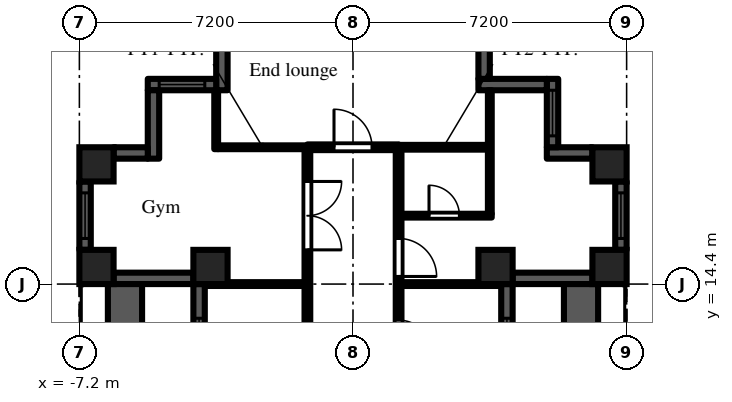
"""IFC4 building model, lengths in metres.
Left out: names, types, materials, properties, quantities, classifications, styles, units other than length and angle.
Written with IfcOpenShell. Run it as: python <this file> out.ifc"""

import sys

from ifc_helpers import new_model, si_unit, direction, frame, frame_2d, origin, origin_2d, place, context, subcontext, project, spatial, rectangle, extrude, element, fill, save


model = new_model("IFC4")
c1 = context("Model", 3, precision=1e-05, world=origin(), true_north=direction((0.0, 1.0)))
c2 = subcontext(c1, "Body", "Model", "MODEL_VIEW")
j1 = project(units=[si_unit("LENGTHUNIT", "METRE"), si_unit("PLANEANGLEUNIT", "RADIAN")], contexts=[c1])
p1 = place(None, origin())
s1 = spatial("IfcSite", under=j1, at=p1, CompositionType="ELEMENT")
p2 = place(p1, origin())
s2 = spatial("IfcBuilding", under=s1, at=p2, CompositionType="ELEMENT")
p3 = place(p2, frame((0.0, 0.0, 108.9)))
s3 = spatial("IfcBuildingStorey", under=s2, at=p3, CompositionType="ELEMENT", Elevation=108.9)
for number, where, z_axis, x_axis in (
    (1, (-6.75, 14.85, 0.0), (0.0, 0.0, 1.0), (1.0, 0.0, 0.0)),
    (2, (-6.75, 17.55, 0.0), (0.0, 0.0, 1.0), (1.0, 0.0, 0.0)),
    (3, (-3.75, 14.85, 0.0), (0.0, 0.0, 1.0), (1.0, 0.0, 0.0)),
    (4, (3.75, 14.85, 0.0), (0.0, 0.0, 1.0), (1.0, 0.0, 0.0)),
    (5, (6.75, 14.85, 0.0), (0.0, 0.0, 1.0), (1.0, 0.0, 0.0)),
    (6, (6.75, 17.55, 0.0), (0.0, 0.0, 1.0), (1.0, 0.0, 0.0)),
):
    element("IfcColumn", number, at=place(p3, frame(where, z_axis=z_axis, x_axis=x_axis)), inside=s3, PredefinedType="COLUMN", context=c2, shape_type="SweptSolid", body=[
        extrude(rectangle(XDim=0.9, YDim=0.9, at=origin_2d()), origin(), (0.0, 0.0, 1.0), 3.0),
    ])
p4 = place(p3, frame((4.05, 7.2, 0.0), z_axis=(0.0, 0.0, 1.0), x_axis=(0.0, 1.0, 0.0)))
e7 = element("IfcWall", 7, at=p4, inside=s3, PredefinedType="SOLIDWALL", context=c2, shape_type="SweptSolid", body=[
    extrude(rectangle(XDim=7.2, YDim=0.3, at=frame_2d((3.6, 0.0))), origin(), (0.0, 0.0, 1.0), 2.55),
])
p5 = place(p4, frame((3.0, 0.0, 0.0)))
e8 = element("IfcOpeningElement", 8, at=p5, cuts=e7, PredefinedType="OPENING", context=c2, shape_type="SweptSolid", body=[
    extrude(rectangle(XDim=1.2, YDim=2.05, at=frame_2d((0.6, 1.025))), frame((0.0, 0.16, 0.0), z_axis=(0.0, -1.0, 0.0), x_axis=(1.0, 0.0, 0.0)), (0.0, 0.0, 1.0), 0.32),
])
p6 = place(p4, frame((0.9, 0.0, 0.2)))
e9 = element("IfcOpeningElement", 9, at=p6, cuts=e7, PredefinedType="OPENING", context=c2, shape_type="SweptSolid", body=[
    extrude(rectangle(XDim=1.8, YDim=1.85, at=frame_2d((0.9, 0.925))), frame((0.0, 0.16, 0.0), z_axis=(0.0, -1.0, 0.0), x_axis=(1.0, 0.0, 0.0)), (0.0, 0.0, 1.0), 0.32),
])
p7 = place(p4, frame((4.5, 0.0, 0.2)))
e10 = element("IfcOpeningElement", 10, at=p7, cuts=e7, PredefinedType="OPENING", context=c2, shape_type="SweptSolid", body=[
    extrude(rectangle(XDim=1.8, YDim=1.85, at=frame_2d((0.9, 0.925))), frame((0.0, 0.16, 0.0), z_axis=(0.0, -1.0, 0.0), x_axis=(1.0, 0.0, 0.0)), (0.0, 0.0, 1.0), 0.32),
])
p8 = place(p3, frame((4.2, 14.55, 0.0), z_axis=(0.0, 0.0, 1.0), x_axis=(1.0, 0.0, 0.0)))
e11 = element("IfcWall", 11, at=p8, inside=s3, PredefinedType="SOLIDWALL", context=c2, shape_type="SweptSolid", body=[
    extrude(rectangle(XDim=2.1, YDim=0.3, at=frame_2d((1.05, 0.0))), origin(), (0.0, 0.0, 1.0), 2.55),
])
p9 = place(p3, frame((7.05, 15.3, 0.0), z_axis=(0.0, 0.0, 1.0), x_axis=(0.0, 1.0, 0.0)))
e12 = element("IfcWall", 12, at=p9, inside=s3, PredefinedType="SOLIDWALL", context=c2, shape_type="SweptSolid", body=[
    extrude(rectangle(XDim=1.8, YDim=0.3, at=frame_2d((0.9, 0.0))), origin(), (0.0, 0.0, 1.0), 2.2),
])
p10 = place(p9, frame((0.3, 0.0, 0.2)))
e13 = element("IfcOpeningElement", 13, at=p10, cuts=e12, PredefinedType="OPENING", context=c2, shape_type="SweptSolid", body=[
    extrude(rectangle(XDim=1.2, YDim=1.85, at=frame_2d((0.6, 0.925))), frame((0.0, 0.16, 0.0), z_axis=(0.0, -1.0, 0.0), x_axis=(1.0, 0.0, 0.0)), (0.0, 0.0, 1.0), 0.32),
])
p11 = place(p3, frame((6.3, 17.85, 0.0), z_axis=(0.0, 0.0, 1.0), x_axis=(-1.0, 0.0, 0.0)))
e14 = element("IfcWall", 14, at=p11, inside=s3, PredefinedType="SOLIDWALL", context=c2, shape_type="SweptSolid", body=[
    extrude(rectangle(XDim=1.2, YDim=0.3, at=frame_2d((0.6, 0.0))), origin(), (0.0, 0.0, 1.0), 2.55),
])
p12 = place(p3, frame((5.25, 18.0, 0.0), z_axis=(0.0, 0.0, 1.0), x_axis=(0.0, 1.0, 0.0)))
e15 = element("IfcWall", 15, at=p12, inside=s3, PredefinedType="SOLIDWALL", context=c2, shape_type="SweptSolid", body=[
    extrude(rectangle(XDim=1.8, YDim=0.3, at=frame_2d((0.9, 0.0))), origin(), (0.0, 0.0, 1.0), 2.55),
])
p13 = place(p12, frame((0.3, 0.0, 0.2)))
e16 = element("IfcOpeningElement", 16, at=p13, cuts=e15, PredefinedType="OPENING", context=c2, shape_type="SweptSolid", body=[
    extrude(rectangle(XDim=1.2, YDim=1.85, at=frame_2d((0.6, 0.925))), frame((0.0, 0.16, 0.0), z_axis=(0.0, -1.0, 0.0), x_axis=(1.0, 0.0, 0.0)), (0.0, 0.0, 1.0), 0.32),
])
p14 = place(p3, frame((5.1, 19.65, 0.0), z_axis=(0.0, 0.0, 1.0), x_axis=(-1.0, 0.0, 0.0)))
e17 = element("IfcWall", 17, at=p14, inside=s3, PredefinedType="SOLIDWALL", context=c2, shape_type="SweptSolid", body=[
    extrude(rectangle(XDim=1.8, YDim=0.3, at=frame_2d((0.9, 0.0))), origin(), (0.0, 0.0, 1.0), 2.55),
])
p15 = place(p3, frame((3.45, 19.8, 0.0), z_axis=(0.0, 0.0, 1.0), x_axis=(0.0, 1.0, 0.0)))
e18 = element("IfcWall", 18, at=p15, inside=s3, PredefinedType="SOLIDWALL", context=c2, shape_type="SweptSolid", body=[
    extrude(rectangle(XDim=0.9, YDim=0.3, at=frame_2d((0.45, 0.0))), origin(), (0.0, 0.0, 1.0), 2.55),
])
p16 = place(p3, frame((-3.45, 20.7, 0.0), z_axis=(0.0, 0.0, 1.0), x_axis=(0.0, -1.0, 0.0)))
e19 = element("IfcWall", 19, at=p16, inside=s3, PredefinedType="SOLIDWALL", context=c2, shape_type="SweptSolid", body=[
    extrude(rectangle(XDim=1.2, YDim=0.3, at=frame_2d((0.6, 0.0))), origin(), (0.0, 0.0, 1.0), 2.55),
])
p17 = place(p3, frame((-3.6, 19.65, 0.0), z_axis=(0.0, 0.0, 1.0), x_axis=(-1.0, 0.0, 0.0)))
e20 = element("IfcWall", 20, at=p17, inside=s3, PredefinedType="SOLIDWALL", context=c2, shape_type="SweptSolid", body=[
    extrude(rectangle(XDim=1.8, YDim=0.3, at=frame_2d((0.9, 0.0))), origin(), (0.0, 0.0, 1.0), 2.55),
])
p18 = place(p17, frame((0.3, 0.0, 0.2)))
e21 = element("IfcOpeningElement", 21, at=p18, cuts=e20, PredefinedType="OPENING", context=c2, shape_type="SweptSolid", body=[
    extrude(rectangle(XDim=1.2, YDim=1.85, at=frame_2d((0.6, 0.925))), frame((0.0, 0.16, 0.0), z_axis=(0.0, -1.0, 0.0), x_axis=(1.0, 0.0, 0.0)), (0.0, 0.0, 1.0), 0.32),
])
p19 = place(p3, frame((-5.25, 19.5, 0.0), z_axis=(0.0, 0.0, 1.0), x_axis=(0.0, -1.0, 0.0)))
e22 = element("IfcWall", 22, at=p19, inside=s3, PredefinedType="SOLIDWALL", context=c2, shape_type="SweptSolid", body=[
    extrude(rectangle(XDim=1.8, YDim=0.3, at=frame_2d((0.9, 0.0))), origin(), (0.0, 0.0, 1.0), 2.55),
])
p20 = place(p3, frame((-5.4, 17.85, 0.0), z_axis=(0.0, 0.0, 1.0), x_axis=(-1.0, 0.0, 0.0)))
e23 = element("IfcWall", 23, at=p20, inside=s3, PredefinedType="SOLIDWALL", context=c2, shape_type="SweptSolid", body=[
    extrude(rectangle(XDim=0.9, YDim=0.3, at=frame_2d((0.45, 0.0))), origin(), (0.0, 0.0, 1.0), 2.55),
])
p21 = place(p3, frame((-7.05, 17.1, 0.0), z_axis=(0.0, 0.0, 1.0), x_axis=(0.0, -1.0, 0.0)))
e24 = element("IfcWall", 24, at=p21, inside=s3, PredefinedType="SOLIDWALL", context=c2, shape_type="SweptSolid", body=[
    extrude(rectangle(XDim=1.8, YDim=0.3, at=frame_2d((0.9, 0.0))), origin(), (0.0, 0.0, 1.0), 2.2),
])
p22 = place(p21, frame((0.3, 0.0, 0.2)))
e25 = element("IfcOpeningElement", 25, at=p22, cuts=e24, PredefinedType="OPENING", context=c2, shape_type="SweptSolid", body=[
    extrude(rectangle(XDim=1.2, YDim=1.85, at=frame_2d((0.6, 0.925))), frame((0.0, 0.16, 0.0), z_axis=(0.0, -1.0, 0.0), x_axis=(1.0, 0.0, 0.0)), (0.0, 0.0, 1.0), 0.32),
])
p23 = place(p3, frame((-6.3, 14.55, 0.0), z_axis=(0.0, 0.0, 1.0), x_axis=(1.0, 0.0, 0.0)))
e26 = element("IfcWall", 26, at=p23, inside=s3, PredefinedType="SOLIDWALL", context=c2, shape_type="SweptSolid", body=[
    extrude(rectangle(XDim=2.1, YDim=0.3, at=frame_2d((1.05, 0.0))), origin(), (0.0, 0.0, 1.0), 2.55),
])
p24 = place(p3, frame((-4.05, 14.4, 0.0), z_axis=(0.0, 0.0, 1.0), x_axis=(0.0, -1.0, 0.0)))
e27 = element("IfcWall", 27, at=p24, inside=s3, PredefinedType="SOLIDWALL", context=c2, shape_type="SweptSolid", body=[
    extrude(rectangle(XDim=7.2, YDim=0.3, at=frame_2d((3.6, 0.0))), origin(), (0.0, 0.0, 1.0), 2.55),
])
p25 = place(p24, frame((3.0, 0.0, 0.0)))
e28 = element("IfcOpeningElement", 28, at=p25, cuts=e27, PredefinedType="OPENING", context=c2, shape_type="SweptSolid", body=[
    extrude(rectangle(XDim=1.2, YDim=2.05, at=frame_2d((0.6, 1.025))), frame((0.0, 0.16, 0.0), z_axis=(0.0, -1.0, 0.0), x_axis=(1.0, 0.0, 0.0)), (0.0, 0.0, 1.0), 0.32),
])
p26 = place(p24, frame((0.9, 0.0, 0.2)))
e29 = element("IfcOpeningElement", 29, at=p26, cuts=e27, PredefinedType="OPENING", context=c2, shape_type="SweptSolid", body=[
    extrude(rectangle(XDim=1.8, YDim=1.85, at=frame_2d((0.9, 0.925))), frame((0.0, 0.16, 0.0), z_axis=(0.0, -1.0, 0.0), x_axis=(1.0, 0.0, 0.0)), (0.0, 0.0, 1.0), 0.32),
])
p27 = place(p24, frame((4.5, 0.0, 0.2)))
e30 = element("IfcOpeningElement", 30, at=p27, cuts=e27, PredefinedType="OPENING", context=c2, shape_type="SweptSolid", body=[
    extrude(rectangle(XDim=1.8, YDim=1.85, at=frame_2d((0.9, 0.925))), frame((0.0, 0.16, 0.0), z_axis=(0.0, -1.0, 0.0), x_axis=(1.0, 0.0, 0.0)), (0.0, 0.0, 1.0), 0.32),
])
for number, where, z_axis, x_axis in (
    (31, (6.0, 7.2, 0.0), (0.0, 0.0, 1.0), (0.0, 1.0, 0.0)),
    (32, (-6.0, 7.2, 0.0), (0.0, 0.0, 1.0), (0.0, 1.0, 0.0)),
):
    element("IfcWall", number, at=place(p3, frame(where, z_axis=z_axis, x_axis=x_axis)), inside=s3, PredefinedType="PARAPET", context=c2, shape_type="SweptSolid", body=[
        extrude(rectangle(XDim=7.2, YDim=0.9, at=frame_2d((3.6, 0.0))), origin(), (0.0, 0.0, 1.0), 0.8),
    ])
p28 = place(p3, frame((-3.9, 14.4, 0.0), z_axis=(0.0, 0.0, 1.0), x_axis=(1.0, 0.0, 0.0)))
e33 = element("IfcWall", 33, at=p28, inside=s3, PredefinedType="PARTITIONING", context=c2, shape_type="SweptSolid", body=[
    extrude(rectangle(XDim=2.625, YDim=0.1, at=frame_2d((1.312, 0.0))), origin(), (0.0, 0.0, 1.0), 2.55),
])
p29 = place(p3, frame((-3.6, 17.95, 0.0), z_axis=(0.0, 0.0, 1.0), x_axis=(0.0, 1.0, 0.0)))
e34 = element("IfcWall", 34, at=p29, inside=s3, PredefinedType="PARTITIONING", context=c2, shape_type="SweptSolid", body=[
    extrude(rectangle(XDim=1.55, YDim=0.1, at=frame_2d((0.775, 0.0))), origin(), (0.0, 0.0, 1.0), 2.55),
])
p30 = place(p3, frame((-3.55, 18.0, 0.0), z_axis=(0.0, 0.0, 1.0), x_axis=(1.0, 0.0, 0.0)))
e35 = element("IfcWall", 35, at=p30, inside=s3, PredefinedType="PARTITIONING", context=c2, shape_type="SweptSolid", body=[
    extrude(rectangle(XDim=2.35, YDim=0.1, at=frame_2d((1.175, 0.0))), origin(), (0.0, 0.0, 1.0), 2.55),
])
p31 = place(p3, frame((-1.2, 1.275, 0.0), z_axis=(0.0, 0.0, 1.0), x_axis=(0.0, 1.0, 0.0)))
e36 = element("IfcWall", 36, at=p31, inside=s3, PredefinedType="PARTITIONING", context=c2, shape_type="SweptSolid", body=[
    extrude(rectangle(XDim=16.65, YDim=0.15, at=frame_2d((8.325, 0.0))), origin(), (0.0, 0.0, 1.0), 2.55),
])
p32 = place(p31, frame((3.575, 0.0, 0.0)))
e37 = element("IfcOpeningElement", 37, at=p32, cuts=e36, PredefinedType="OPENING", context=c2, shape_type="SweptSolid", body=[
    extrude(rectangle(XDim=0.9, YDim=2.1, at=frame_2d((0.45, 1.05))), frame((0.0, 0.085, 0.0), z_axis=(0.0, -1.0, 0.0), x_axis=(1.0, 0.0, 0.0)), (0.0, 0.0, 1.0), 0.17),
])
p33 = place(p31, frame((6.875, 0.0, 0.0)))
e38 = element("IfcOpeningElement", 38, at=p33, cuts=e36, PredefinedType="OPENING", context=c2, shape_type="SweptSolid", body=[
    extrude(rectangle(XDim=0.9, YDim=2.1, at=frame_2d((0.45, 1.05))), frame((0.0, 0.085, 0.0), z_axis=(0.0, -1.0, 0.0), x_axis=(1.0, 0.0, 0.0)), (0.0, 0.0, 1.0), 0.17),
])
p34 = place(p31, frame((10.475, 0.0, 0.0)))
e39 = element("IfcOpeningElement", 39, at=p34, cuts=e36, PredefinedType="OPENING", context=c2, shape_type="SweptSolid", body=[
    extrude(rectangle(XDim=0.9, YDim=2.1, at=frame_2d((0.45, 1.05))), frame((0.0, 0.085, 0.0), z_axis=(0.0, -1.0, 0.0), x_axis=(1.0, 0.0, 0.0)), (0.0, 0.0, 1.0), 0.17),
])
p35 = place(p31, frame((14.025, 0.0, 0.0)))
e40 = element("IfcOpeningElement", 40, at=p35, cuts=e36, PredefinedType="OPENING", context=c2, shape_type="SweptSolid", body=[
    extrude(rectangle(XDim=1.8, YDim=2.1, at=frame_2d((0.9, 1.05))), frame((0.0, 0.085, 0.0), z_axis=(0.0, -1.0, 0.0), x_axis=(1.0, 0.0, 0.0)), (0.0, 0.0, 1.0), 0.17),
])
p36 = place(p3, frame((-1.2, 18.0, 0.0), z_axis=(0.0, 0.0, 1.0), x_axis=(1.0, 0.0, 0.0)))
e41 = element("IfcWall", 41, at=p36, inside=s3, PredefinedType="PARTITIONING", context=c2, shape_type="SweptSolid", body=[
    extrude(rectangle(XDim=2.4, YDim=0.15, at=frame_2d((1.2, 0.0))), origin(), (0.0, 0.0, 1.0), 2.55),
])
p37 = place(p36, frame((0.7, 0.0, 0.0)))
e42 = element("IfcOpeningElement", 42, at=p37, cuts=e41, PredefinedType="OPENING", context=c2, shape_type="SweptSolid", body=[
    extrude(rectangle(XDim=1.0, YDim=2.1, at=frame_2d((0.5, 1.05))), frame((0.0, 0.085, 0.0), z_axis=(0.0, -1.0, 0.0), x_axis=(1.0, 0.0, 0.0)), (0.0, 0.0, 1.0), 0.17),
])
p38 = place(p3, frame((1.2, 1.125, 0.0), z_axis=(0.0, 0.0, 1.0), x_axis=(0.0, 1.0, 0.0)))
e43 = element("IfcWall", 43, at=p38, inside=s3, PredefinedType="PARTITIONING", context=c2, shape_type="SweptSolid", body=[
    extrude(rectangle(XDim=16.8, YDim=0.15, at=frame_2d((8.4, 0.0))), origin(), (0.0, 0.0, 1.0), 2.55),
])
p39 = place(p38, frame((3.725, 0.0, 0.0)))
e44 = element("IfcOpeningElement", 44, at=p39, cuts=e43, PredefinedType="OPENING", context=c2, shape_type="SweptSolid", body=[
    extrude(rectangle(XDim=0.9, YDim=2.1, at=frame_2d((0.45, 1.05))), frame((0.0, 0.085, 0.0), z_axis=(0.0, -1.0, 0.0), x_axis=(1.0, 0.0, 0.0)), (0.0, 0.0, 1.0), 0.17),
])
p40 = place(p38, frame((11.425, 0.0, 0.0)))
e45 = element("IfcOpeningElement", 45, at=p40, cuts=e43, PredefinedType="OPENING", context=c2, shape_type="SweptSolid", body=[
    extrude(rectangle(XDim=0.9, YDim=2.1, at=frame_2d((0.45, 1.05))), frame((0.0, 0.085, 0.0), z_axis=(0.0, -1.0, 0.0), x_axis=(1.0, 0.0, 0.0)), (0.0, 0.0, 1.0), 0.17),
])
p41 = place(p38, frame((7.825, 0.0, 0.0)))
e46 = element("IfcOpeningElement", 46, at=p41, cuts=e43, PredefinedType="OPENING", context=c2, shape_type="SweptSolid", body=[
    extrude(rectangle(XDim=0.9, YDim=2.1, at=frame_2d((0.45, 1.05))), frame((0.0, 0.085, 0.0), z_axis=(0.0, -1.0, 0.0), x_axis=(1.0, 0.0, 0.0)), (0.0, 0.0, 1.0), 0.17),
])
p42 = place(p38, frame((13.475, 0.0, 0.0)))
e47 = element("IfcOpeningElement", 47, at=p42, cuts=e43, PredefinedType="OPENING", context=c2, shape_type="SweptSolid", body=[
    extrude(rectangle(XDim=1.0, YDim=2.1, at=frame_2d((0.5, 1.05))), frame((0.0, 0.085, 0.0), z_axis=(0.0, -1.0, 0.0), x_axis=(1.0, 0.0, 0.0)), (0.0, 0.0, 1.0), 0.17),
])
p43 = place(p3, frame((1.275, 14.4, 0.0), z_axis=(0.0, 0.0, 1.0), x_axis=(1.0, 0.0, 0.0)))
e48 = element("IfcWall", 48, at=p43, inside=s3, PredefinedType="PARTITIONING", context=c2, shape_type="SweptSolid", body=[
    extrude(rectangle(XDim=2.625, YDim=0.1, at=frame_2d((1.312, 0.0))), origin(), (0.0, 0.0, 1.0), 2.55),
])
p44 = place(p3, frame((1.275, 16.2, 0.0), z_axis=(0.0, 0.0, 1.0), x_axis=(1.0, 0.0, 0.0)))
e49 = element("IfcWall", 49, at=p44, inside=s3, PredefinedType="PARTITIONING", context=c2, shape_type="SweptSolid", body=[
    extrude(rectangle(XDim=2.375, YDim=0.1, at=frame_2d((1.188, 0.0))), origin(), (0.0, 0.0, 1.0), 2.55),
])
p45 = place(p44, frame((0.725, 0.0, 0.0)))
e50 = element("IfcOpeningElement", 50, at=p45, cuts=e49, PredefinedType="OPENING", context=c2, shape_type="SweptSolid", body=[
    extrude(rectangle(XDim=0.8, YDim=2.1, at=frame_2d((0.4, 1.05))), frame((0.0, 0.06, 0.0), z_axis=(0.0, -1.0, 0.0), x_axis=(1.0, 0.0, 0.0)), (0.0, 0.0, 1.0), 0.12),
])
p46 = place(p3, frame((1.2, 18.0, 0.0), z_axis=(0.0, 0.0, 1.0), x_axis=(1.0, 0.0, 0.0)))
e51 = element("IfcWall", 51, at=p46, inside=s3, PredefinedType="PARTITIONING", context=c2, shape_type="SweptSolid", body=[
    extrude(rectangle(XDim=2.35, YDim=0.125, at=frame_2d((1.175, 0.0))), origin(), (0.0, 0.0, 1.0), 2.55),
])
p47 = place(p3, frame((3.6, 16.25, 0.0), z_axis=(0.0, 0.0, 1.0), x_axis=(0.0, 1.0, 0.0)))
e52 = element("IfcWall", 52, at=p47, inside=s3, PredefinedType="PARTITIONING", context=c2, shape_type="SweptSolid", body=[
    extrude(rectangle(XDim=3.25, YDim=0.1, at=frame_2d((1.625, 0.0))), origin(), (0.0, 0.0, 1.0), 2.55),
])
p48 = place(p7, origin())
e53 = element("IfcWindow", 53, at=p48, inside=s3, PartitioningType="SINGLE_PANEL", PredefinedType="WINDOW", context=c2, shape_type="SweptSolid", body=[
    extrude(rectangle(XDim=1.8, YDim=1.85, at=frame_2d((0.9, 0.925))), frame((0.0, 0.03, 0.0), z_axis=(0.0, -1.0, 0.0), x_axis=(1.0, 0.0, 0.0)), (0.0, 0.0, 1.0), 0.06),
])
fill(e10, e53)
p49 = place(p10, origin())
e54 = element("IfcWindow", 54, at=p49, inside=s3, PartitioningType="SINGLE_PANEL", PredefinedType="WINDOW", context=c2, shape_type="SweptSolid", body=[
    extrude(rectangle(XDim=1.2, YDim=1.85, at=frame_2d((0.6, 0.925))), frame((0.0, 0.03, 0.0), z_axis=(0.0, -1.0, 0.0), x_axis=(1.0, 0.0, 0.0)), (0.0, 0.0, 1.0), 0.06),
])
fill(e13, e54)
p50 = place(p13, origin())
e55 = element("IfcWindow", 55, at=p50, inside=s3, PartitioningType="SINGLE_PANEL", PredefinedType="WINDOW", context=c2, shape_type="SweptSolid", body=[
    extrude(rectangle(XDim=1.2, YDim=1.85, at=frame_2d((0.6, 0.925))), frame((0.0, 0.03, 0.0), z_axis=(0.0, -1.0, 0.0), x_axis=(1.0, 0.0, 0.0)), (0.0, 0.0, 1.0), 0.06),
])
fill(e16, e55)
p51 = place(p18, origin())
e56 = element("IfcWindow", 56, at=p51, inside=s3, PartitioningType="SINGLE_PANEL", PredefinedType="WINDOW", context=c2, shape_type="SweptSolid", body=[
    extrude(rectangle(XDim=1.2, YDim=1.85, at=frame_2d((0.6, 0.925))), frame((0.0, 0.03, 0.0), z_axis=(0.0, -1.0, 0.0), x_axis=(1.0, 0.0, 0.0)), (0.0, 0.0, 1.0), 0.06),
])
fill(e21, e56)
p52 = place(p22, origin())
e57 = element("IfcWindow", 57, at=p52, inside=s3, PartitioningType="SINGLE_PANEL", PredefinedType="WINDOW", context=c2, shape_type="SweptSolid", body=[
    extrude(rectangle(XDim=1.2, YDim=1.85, at=frame_2d((0.6, 0.925))), frame((0.0, 0.03, 0.0), z_axis=(0.0, -1.0, 0.0), x_axis=(1.0, 0.0, 0.0)), (0.0, 0.0, 1.0), 0.06),
])
fill(e25, e57)
p53 = place(p26, origin())
e58 = element("IfcWindow", 58, at=p53, inside=s3, PartitioningType="SINGLE_PANEL", PredefinedType="WINDOW", context=c2, shape_type="SweptSolid", body=[
    extrude(rectangle(XDim=1.8, YDim=1.85, at=frame_2d((0.9, 0.925))), frame((0.0, 0.03, 0.0), z_axis=(0.0, -1.0, 0.0), x_axis=(1.0, 0.0, 0.0)), (0.0, 0.0, 1.0), 0.06),
])
fill(e29, e58)
p54 = place(p37, origin())
e59 = element("IfcDoor", 59, at=p54, inside=s3, OperationType="SINGLE_SWING_LEFT", PredefinedType="DOOR", context=c2, shape_type="SweptSolid", body=[
    extrude(rectangle(XDim=1.0, YDim=2.1, at=frame_2d((0.5, 1.05))), frame((0.0, 0.025, 0.0), z_axis=(0.0, -1.0, 0.0), x_axis=(1.0, 0.0, 0.0)), (0.0, 0.0, 1.0), 0.05),
])
fill(e42, e59)
p55 = place(p35, frame((1.8, 0.0, 0.0), z_axis=(0.0, 0.0, 1.0), x_axis=(-1.0, 0.0, 0.0)))
e60 = element("IfcDoor", 60, at=p55, inside=s3, OperationType="DOUBLE_DOOR_DOUBLE_SWING", PredefinedType="DOOR", context=c2, shape_type="SweptSolid", body=[
    extrude(rectangle(XDim=1.8, YDim=2.1, at=frame_2d((0.9, 1.05))), frame((0.0, 0.025, 0.0), z_axis=(0.0, -1.0, 0.0), x_axis=(1.0, 0.0, 0.0)), (0.0, 0.0, 1.0), 0.05),
])
fill(e40, e60)
p56 = place(p40, frame((0.9, 0.0, 0.0), z_axis=(0.0, 0.0, 1.0), x_axis=(-1.0, 0.0, 0.0)))
e61 = element("IfcDoor", 61, at=p56, inside=s3, OperationType="SINGLE_SWING_RIGHT", PredefinedType="DOOR", context=c2, shape_type="SweptSolid", body=[
    extrude(rectangle(XDim=0.9, YDim=2.1, at=frame_2d((0.45, 1.05))), frame((0.0, 0.025, 0.0), z_axis=(0.0, -1.0, 0.0), x_axis=(1.0, 0.0, 0.0)), (0.0, 0.0, 1.0), 0.05),
])
fill(e45, e61)
p57 = place(p45, origin())
e62 = element("IfcDoor", 62, at=p57, inside=s3, OperationType="SINGLE_SWING_LEFT", PredefinedType="DOOR", context=c2, shape_type="SweptSolid", body=[
    extrude(rectangle(XDim=0.8, YDim=2.1, at=frame_2d((0.4, 1.05))), frame((0.0, 0.025, 0.0), z_axis=(0.0, -1.0, 0.0), x_axis=(1.0, 0.0, 0.0)), (0.0, 0.0, 1.0), 0.05),
])
fill(e50, e62)
p58 = place(p42, frame((1.0, 0.0, 0.0), z_axis=(0.0, 0.0, 1.0), x_axis=(-1.0, 0.0, 0.0)))
e63 = element("IfcDoor", 63, at=p58, inside=s3, OperationType="SINGLE_SWING_RIGHT", PredefinedType="DOOR", context=c2, shape_type="SweptSolid", body=[
    extrude(rectangle(XDim=1.0, YDim=2.1, at=frame_2d((0.5, 1.05))), frame((0.0, 0.025, 0.0), z_axis=(0.0, -1.0, 0.0), x_axis=(1.0, 0.0, 0.0)), (0.0, 0.0, 1.0), 0.05),
])
fill(e47, e63)
save(model, sys.argv[1])
